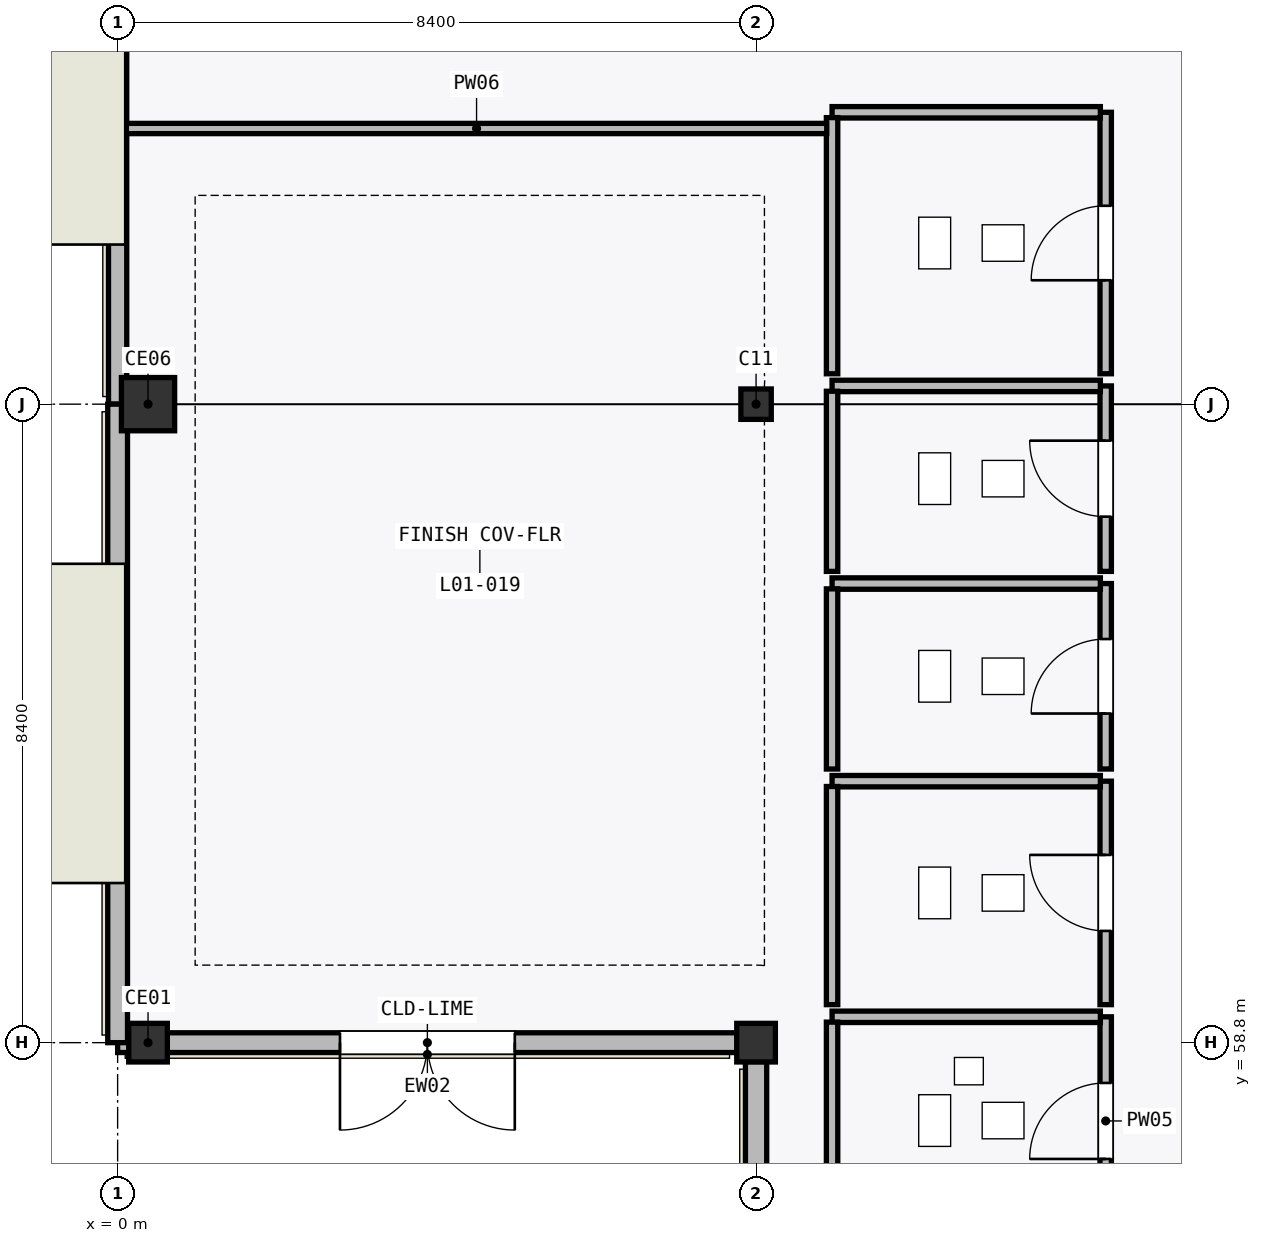
"""IFC4 building model, lengths in metres.
Left out: names, types, materials, properties, quantities, classifications, styles, units other than length and angle.
Written with IfcOpenShell. Run it as: python <this file> out.ifc"""

import sys

from ifc_helpers import new_model, si_unit, direction, frame, frame_2d, origin, origin_2d, place, context, subcontext, project, spatial, rectangle, hollow_circle, i_section, extrude, element, fill, save


model = new_model("IFC4")
c1 = context("Model", 3, precision=1e-05, world=origin(), true_north=direction((0.0, 1.0)))
c2 = subcontext(c1, "Body", "Model", "MODEL_VIEW")
j1 = project(units=[si_unit("LENGTHUNIT", "METRE"), si_unit("PLANEANGLEUNIT", "RADIAN")], contexts=[c1])
p1 = place(None, origin())
s1 = spatial("IfcSite", under=j1, at=p1, CompositionType="ELEMENT")
p2 = place(p1, origin())
s2 = spatial("IfcBuilding", under=s1, at=p2, CompositionType="ELEMENT")
p3 = place(p2, origin())
s3 = spatial("IfcBuildingStorey", under=s2, at=p3, CompositionType="ELEMENT", Elevation=0.0)
p4 = place(p3, frame((0.4, 58.8, 0.0), z_axis=(0.0, 0.0, 1.0), x_axis=(1.0, 0.0, 0.0)))
e1 = element("IfcColumn", 1, at=p4, inside=s3, PredefinedType="COLUMN", context=c2, shape_type="SweptSolid", body=[
    extrude(hollow_circle(Radius=0.254, WallThickness=0.016, at=origin_2d()), origin(), (0.0, 0.0, 1.0), 6.0),
])
p5 = place(p3, frame((0.4, 67.2, 0.0), z_axis=(0.0, 0.0, 1.0), x_axis=(1.0, 0.0, 0.0)))
e2 = element("IfcColumn", 2, at=p5, inside=s3, PredefinedType="COLUMN", context=c2, shape_type="SweptSolid", body=[
    extrude(rectangle(XDim=0.7, YDim=0.7, at=origin_2d()), origin(), (0.0, 0.0, 1.0), 6.0),
])
p6 = place(p3, frame((8.4, 58.8, 0.0), z_axis=(0.0, 0.0, 1.0), x_axis=(1.0, 0.0, 0.0)))
e3 = element("IfcColumn", 3, at=p6, inside=s3, PredefinedType="COLUMN", context=c2, shape_type="SweptSolid", body=[
    extrude(hollow_circle(Radius=0.254, WallThickness=0.016, at=origin_2d()), origin(), (0.0, 0.0, 1.0), 6.0),
])
p7 = place(p3, frame((8.4, 67.2, 0.0), z_axis=(0.0, 0.0, 1.0), x_axis=(1.0, 0.0, 0.0)))
e4 = element("IfcColumn", 4, at=p7, inside=s3, PredefinedType="COLUMN", context=c2, shape_type="SweptSolid", body=[
    extrude(i_section(OverallWidth=0.4, OverallDepth=0.4, WebThickness=0.013, FlangeThickness=0.021, FilletRadius=0.022, at=origin_2d()), origin(), (0.0, 0.0, 1.0), 6.0),
])
p8 = place(p3, frame((0.0, 58.8, 0.0), z_axis=(0.0, 0.0, 1.0), x_axis=(1.0, 0.0, 0.0)))
e5 = element("IfcWall", 5, at=p8, inside=s3, PredefinedType="STANDARD", context=c2, shape_type="SweptSolid", body=[
    extrude(rectangle(XDim=8.151, YDim=0.26, at=frame_2d((4.075, 0.0))), origin(), (0.0, 0.0, 1.0), 5.231),
])
p9 = place(p8, frame((2.926, 0.0, 0.0)))
e6 = element("IfcOpeningElement", 6, at=p9, cuts=e5, PredefinedType="OPENING", context=c2, shape_type="SweptSolid", body=[
    extrude(rectangle(XDim=2.3, YDim=2.4, at=frame_2d((1.15, 1.2))), frame((0.0, 0.14, 0.0), z_axis=(0.0, -1.0, 0.0), x_axis=(1.0, 0.0, 0.0)), (0.0, 0.0, 1.0), 0.28),
])
p10 = place(p3, frame((8.4, 58.551, 0.0), z_axis=(0.0, 0.0, 1.0), x_axis=(0.0, -1.0, 0.0)))
e7 = element("IfcWall", 7, at=p10, inside=s3, PredefinedType="STANDARD", context=c2, shape_type="SweptSolid", body=[
    extrude(rectangle(XDim=7.831, YDim=0.28, at=frame_2d((3.916, 0.0))), origin(), (0.0, 0.0, 1.0), 5.231),
])
p11 = place(p10, frame((2.765, 0.0, 0.0)))
e8 = element("IfcOpeningElement", 8, at=p11, cuts=e7, PredefinedType="OPENING", context=c2, shape_type="SweptSolid", body=[
    extrude(rectangle(XDim=2.3, YDim=2.4, at=frame_2d((1.15, 1.2))), frame((0.0, 0.15, 0.0), z_axis=(0.0, -1.0, 0.0), x_axis=(1.0, 0.0, 0.0)), (0.0, 0.0, 1.0), 0.3),
])
p12 = place(p3, frame((0.0, 75.6, 0.0), z_axis=(0.0, 0.0, 1.0), x_axis=(0.0, -1.0, 0.0)))
e9 = element("IfcWall", 9, at=p12, inside=s3, PredefinedType="STANDARD", context=c2, shape_type="SweptSolid", body=[
    extrude(rectangle(XDim=8.4, YDim=0.24, at=frame_2d((4.2, 0.0))), origin(), (0.0, 0.0, 1.0), 5.745),
])
p13 = place(p12, frame((2.013, 0.0, 0.95)))
e10 = element("IfcOpeningElement", 10, at=p13, cuts=e9, PredefinedType="OPENING", context=c2, shape_type="SweptSolid", body=[
    extrude(rectangle(XDim=1.35, YDim=2.1, at=frame_2d((0.675, 1.05))), frame((0.0, 0.13, 0.0), z_axis=(0.0, -1.0, 0.0), x_axis=(1.0, 0.0, 0.0)), (0.0, 0.0, 1.0), 0.26),
])
p14 = place(p3, frame((0.0, 67.2, 0.0), z_axis=(0.0, 0.0, 1.0), x_axis=(0.0, -1.0, 0.0)))
e11 = element("IfcWall", 11, at=p14, inside=s3, PredefinedType="STANDARD", context=c2, shape_type="SweptSolid", body=[
    extrude(rectangle(XDim=8.4, YDim=0.26, at=frame_2d((4.2, 0.0))), origin(), (0.0, 0.0, 1.0), 5.297),
])
p15 = place(p14, frame((3.45, 0.0, 0.95)))
e12 = element("IfcOpeningElement", 12, at=p15, cuts=e11, PredefinedType="OPENING", context=c2, shape_type="SweptSolid", body=[
    extrude(rectangle(XDim=1.5, YDim=2.1, at=frame_2d((0.75, 1.05))), frame((0.0, 0.14, 0.0), z_axis=(0.0, -1.0, 0.0), x_axis=(1.0, 0.0, 0.0)), (0.0, 0.0, 1.0), 0.28),
])
p16 = place(p3, frame((13.0, 56.4, 0.0), z_axis=(0.0, 0.0, 1.0), x_axis=(0.0, 1.0, 0.0)))
e13 = element("IfcWall", 13, at=p16, inside=s3, PredefinedType="PARTITIONING", context=c2, shape_type="SweptSolid", body=[
    extrude(rectangle(XDim=2.74, YDim=0.15, at=frame_2d((1.37, 0.0))), origin(), (0.0, 0.0, 1.0), 5.745),
])
p17 = place(p16, frame((0.87, 0.0, 0.0)))
e14 = element("IfcOpeningElement", 14, at=p17, cuts=e13, PredefinedType="OPENING", context=c2, shape_type="SweptSolid", body=[
    extrude(rectangle(XDim=1.0, YDim=2.1, at=frame_2d((0.5, 1.05))), frame((0.0, 0.085, 0.0), z_axis=(0.0, -1.0, 0.0), x_axis=(1.0, 0.0, 0.0)), (0.0, 0.0, 1.0), 0.17),
])
p18 = place(p3, frame((12.93, 59.14, 0.0), z_axis=(0.0, 0.0, 1.0), x_axis=(-1.0, 0.0, 0.0)))
e15 = element("IfcWall", 15, at=p18, inside=s3, PredefinedType="PARTITIONING", context=c2, shape_type="SweptSolid", body=[
    extrude(rectangle(XDim=3.53, YDim=0.15, at=frame_2d((1.765, 0.0))), origin(), (0.0, 0.0, 1.0), 4.825),
])
p19 = place(p3, frame((9.4, 59.07, 0.0), z_axis=(0.0, 0.0, 1.0), x_axis=(0.0, -1.0, 0.0)))
e16 = element("IfcWall", 16, at=p19, inside=s3, PredefinedType="PARTITIONING", context=c2, shape_type="SweptSolid", body=[
    extrude(rectangle(XDim=2.573, YDim=0.15, at=frame_2d((1.286, 0.0))), origin(), (0.0, 0.0, 1.0), 5.745),
])
p20 = place(p3, frame((13.0, 59.3, 0.0), z_axis=(0.0, 0.0, 1.0), x_axis=(0.0, 1.0, 0.0)))
e17 = element("IfcWall", 17, at=p20, inside=s3, PredefinedType="PARTITIONING", context=c2, shape_type="SweptSolid", body=[
    extrude(rectangle(XDim=2.94, YDim=0.15, at=frame_2d((1.47, 0.0))), origin(), (0.0, 0.0, 1.0), 5.745),
])
p21 = place(p20, frame((0.97, 0.0, 0.0)))
e18 = element("IfcOpeningElement", 18, at=p21, cuts=e17, PredefinedType="OPENING", context=c2, shape_type="SweptSolid", body=[
    extrude(rectangle(XDim=1.0, YDim=2.1, at=frame_2d((0.5, 1.05))), frame((0.0, 0.085, 0.0), z_axis=(0.0, -1.0, 0.0), x_axis=(1.0, 0.0, 0.0)), (0.0, 0.0, 1.0), 0.17),
])
p22 = place(p3, frame((12.93, 62.24, 0.0), z_axis=(0.0, 0.0, 1.0), x_axis=(-1.0, 0.0, 0.0)))
e19 = element("IfcWall", 19, at=p22, inside=s3, PredefinedType="PARTITIONING", context=c2, shape_type="SweptSolid", body=[
    extrude(rectangle(XDim=3.53, YDim=0.15, at=frame_2d((1.765, 0.0))), origin(), (0.0, 0.0, 1.0), 5.745),
])
p23 = place(p3, frame((9.4, 62.17, 0.0), z_axis=(0.0, 0.0, 1.0), x_axis=(0.0, -1.0, 0.0)))
e20 = element("IfcWall", 20, at=p23, inside=s3, PredefinedType="PARTITIONING", context=c2, shape_type="SweptSolid", body=[
    extrude(rectangle(XDim=2.87, YDim=0.15, at=frame_2d((1.435, 0.0))), origin(), (0.0, 0.0, 1.0), 5.745),
])
p24 = place(p3, frame((13.0, 62.4, 0.0), z_axis=(0.0, 0.0, 1.0), x_axis=(0.0, 1.0, 0.0)))
e21 = element("IfcWall", 21, at=p24, inside=s3, PredefinedType="PARTITIONING", context=c2, shape_type="SweptSolid", body=[
    extrude(rectangle(XDim=2.44, YDim=0.15, at=frame_2d((1.22, 0.0))), origin(), (0.0, 0.0, 1.0), 5.745),
])
p25 = place(p24, frame((0.73, 0.0, 0.0)))
e22 = element("IfcOpeningElement", 22, at=p25, cuts=e21, PredefinedType="OPENING", context=c2, shape_type="SweptSolid", body=[
    extrude(rectangle(XDim=0.98, YDim=2.1, at=frame_2d((0.49, 1.05))), frame((0.0, 0.085, 0.0), z_axis=(0.0, -1.0, 0.0), x_axis=(1.0, 0.0, 0.0)), (0.0, 0.0, 1.0), 0.17),
])
p26 = place(p3, frame((12.93, 64.84, 0.0), z_axis=(0.0, 0.0, 1.0), x_axis=(-1.0, 0.0, 0.0)))
e23 = element("IfcWall", 23, at=p26, inside=s3, PredefinedType="PARTITIONING", context=c2, shape_type="SweptSolid", body=[
    extrude(rectangle(XDim=3.53, YDim=0.15, at=frame_2d((1.765, 0.0))), origin(), (0.0, 0.0, 1.0), 5.745),
])
p27 = place(p3, frame((9.4, 64.77, 0.0), z_axis=(0.0, 0.0, 1.0), x_axis=(0.0, -1.0, 0.0)))
e24 = element("IfcWall", 24, at=p27, inside=s3, PredefinedType="PARTITIONING", context=c2, shape_type="SweptSolid", body=[
    extrude(rectangle(XDim=2.37, YDim=0.15, at=frame_2d((1.185, 0.0))), origin(), (0.0, 0.0, 1.0), 5.745),
])
p28 = place(p3, frame((13.0, 65.0, 0.0), z_axis=(0.0, 0.0, 1.0), x_axis=(0.0, 1.0, 0.0)))
e25 = element("IfcWall", 25, at=p28, inside=s3, PredefinedType="PARTITIONING", context=c2, shape_type="SweptSolid", body=[
    extrude(rectangle(XDim=2.44, YDim=0.15, at=frame_2d((1.22, 0.0))), origin(), (0.0, 0.0, 1.0), 5.745),
])
p29 = place(p28, frame((0.72, 0.0, 0.0)))
e26 = element("IfcOpeningElement", 26, at=p29, cuts=e25, PredefinedType="OPENING", context=c2, shape_type="SweptSolid", body=[
    extrude(rectangle(XDim=1.0, YDim=2.1, at=frame_2d((0.5, 1.05))), frame((0.0, 0.085, 0.0), z_axis=(0.0, -1.0, 0.0), x_axis=(1.0, 0.0, 0.0)), (0.0, 0.0, 1.0), 0.17),
])
p30 = place(p3, frame((12.93, 67.44, 0.0), z_axis=(0.0, 0.0, 1.0), x_axis=(-1.0, 0.0, 0.0)))
e27 = element("IfcWall", 27, at=p30, inside=s3, PredefinedType="PARTITIONING", context=c2, shape_type="SweptSolid", body=[
    extrude(rectangle(XDim=3.53, YDim=0.15, at=frame_2d((1.765, 0.0))), origin(), (0.0, 0.0, 1.0), 5.143),
])
p31 = place(p3, frame((9.4, 67.37, 0.0), z_axis=(0.0, 0.0, 1.0), x_axis=(0.0, -1.0, 0.0)))
e28 = element("IfcWall", 28, at=p31, inside=s3, PredefinedType="PARTITIONING", context=c2, shape_type="SweptSolid", body=[
    extrude(rectangle(XDim=2.37, YDim=0.15, at=frame_2d((1.185, 0.0))), origin(), (0.0, 0.0, 1.0), 5.745),
])
p32 = place(p3, frame((13.0, 67.6, 0.0), z_axis=(0.0, 0.0, 1.0), x_axis=(0.0, 1.0, 0.0)))
e29 = element("IfcWall", 29, at=p32, inside=s3, PredefinedType="PARTITIONING", context=c2, shape_type="SweptSolid", body=[
    extrude(rectangle(XDim=3.44, YDim=0.15, at=frame_2d((1.72, 0.0))), origin(), (0.0, 0.0, 1.0), 5.745),
])
p33 = place(p32, frame((1.23, 0.0, 0.0)))
e30 = element("IfcOpeningElement", 30, at=p33, cuts=e29, PredefinedType="OPENING", context=c2, shape_type="SweptSolid", body=[
    extrude(rectangle(XDim=0.98, YDim=2.1, at=frame_2d((0.49, 1.05))), frame((0.0, 0.085, 0.0), z_axis=(0.0, -1.0, 0.0), x_axis=(1.0, 0.0, 0.0)), (0.0, 0.0, 1.0), 0.17),
])
p34 = place(p3, frame((12.93, 71.04, 0.0), z_axis=(0.0, 0.0, 1.0), x_axis=(-1.0, 0.0, 0.0)))
e31 = element("IfcWall", 31, at=p34, inside=s3, PredefinedType="PARTITIONING", context=c2, shape_type="SweptSolid", body=[
    extrude(rectangle(XDim=3.53, YDim=0.15, at=frame_2d((1.765, 0.0))), origin(), (0.0, 0.0, 1.0), 5.745),
])
p35 = place(p3, frame((9.4, 70.97, 0.0), z_axis=(0.0, 0.0, 1.0), x_axis=(0.0, -1.0, 0.0)))
e32 = element("IfcWall", 32, at=p35, inside=s3, PredefinedType="PARTITIONING", context=c2, shape_type="SweptSolid", body=[
    extrude(rectangle(XDim=3.37, YDim=0.15, at=frame_2d((1.685, 0.0))), origin(), (0.0, 0.0, 1.0), 5.745),
])
p36 = place(p3, frame((9.33, 70.827, 0.0), z_axis=(0.0, 0.0, 1.0), x_axis=(-1.0, 0.0, 0.0)))
e33 = element("IfcWall", 33, at=p36, inside=s3, PredefinedType="PARTITIONING", context=c2, shape_type="SweptSolid", body=[
    extrude(rectangle(XDim=9.215, YDim=0.135, at=frame_2d((4.607, 0.0))), origin(), (0.0, 0.0, 1.0), 5.745),
])
p37 = place(p9, frame((2.3, 0.0, 0.0), z_axis=(0.0, 0.0, 1.0), x_axis=(-1.0, 0.0, 0.0)))
e34 = element("IfcDoor", 34, at=p37, inside=s3, OperationType="DOUBLE_DOOR_SINGLE_SWING", PredefinedType="DOOR", context=c2, shape_type="SweptSolid", body=[
    extrude(rectangle(XDim=2.3, YDim=2.4, at=frame_2d((1.15, 1.2))), frame((0.0, 0.025, 0.0), z_axis=(0.0, -1.0, 0.0), x_axis=(1.0, 0.0, 0.0)), (0.0, 0.0, 1.0), 0.05),
])
fill(e6, e34)
p38 = place(p15, origin())
e35 = element("IfcWindow", 35, at=p38, inside=s3, PartitioningType="SINGLE_PANEL", PredefinedType="WINDOW", context=c2, shape_type="SweptSolid", body=[
    extrude(rectangle(XDim=1.5, YDim=2.1, at=frame_2d((0.75, 1.05))), frame((0.0, 0.03, 0.0), z_axis=(0.0, -1.0, 0.0), x_axis=(1.0, 0.0, 0.0)), (0.0, 0.0, 1.0), 0.06),
])
fill(e12, e35)
p39 = place(p17, origin())
e36 = element("IfcDoor", 36, at=p39, inside=s3, OperationType="SINGLE_SWING_LEFT", PredefinedType="DOOR", context=c2, shape_type="SweptSolid", body=[
    extrude(rectangle(XDim=1.0, YDim=2.1, at=frame_2d((0.5, 1.05))), frame((0.0, 0.025, 0.0), z_axis=(0.0, -1.0, 0.0), x_axis=(1.0, 0.0, 0.0)), (0.0, 0.0, 1.0), 0.05),
])
fill(e14, e36)
p40 = place(p21, origin())
e37 = element("IfcDoor", 37, at=p40, inside=s3, OperationType="SINGLE_SWING_RIGHT", PredefinedType="DOOR", context=c2, shape_type="SweptSolid", body=[
    extrude(rectangle(XDim=1.0, YDim=2.1, at=frame_2d((0.5, 1.05))), frame((0.0, 0.025, 0.0), z_axis=(0.0, -1.0, 0.0), x_axis=(1.0, 0.0, 0.0)), (0.0, 0.0, 1.0), 0.05),
])
fill(e18, e37)
p41 = place(p25, origin())
e38 = element("IfcDoor", 38, at=p41, inside=s3, OperationType="SINGLE_SWING_LEFT", PredefinedType="DOOR", context=c2, shape_type="SweptSolid", body=[
    extrude(rectangle(XDim=0.98, YDim=2.1, at=frame_2d((0.49, 1.05))), frame((0.0, 0.025, 0.0), z_axis=(0.0, -1.0, 0.0), x_axis=(1.0, 0.0, 0.0)), (0.0, 0.0, 1.0), 0.05),
])
fill(e22, e38)
p42 = place(p29, origin())
e39 = element("IfcDoor", 39, at=p42, inside=s3, OperationType="SINGLE_SWING_RIGHT", PredefinedType="DOOR", context=c2, shape_type="SweptSolid", body=[
    extrude(rectangle(XDim=1.0, YDim=2.1, at=frame_2d((0.5, 1.05))), frame((0.0, 0.025, 0.0), z_axis=(0.0, -1.0, 0.0), x_axis=(1.0, 0.0, 0.0)), (0.0, 0.0, 1.0), 0.05),
])
fill(e26, e39)
p43 = place(p33, origin())
e40 = element("IfcDoor", 40, at=p43, inside=s3, OperationType="SINGLE_SWING_LEFT", PredefinedType="DOOR", context=c2, shape_type="SweptSolid", body=[
    extrude(rectangle(XDim=0.98, YDim=2.1, at=frame_2d((0.49, 1.05))), frame((0.0, 0.025, 0.0), z_axis=(0.0, -1.0, 0.0), x_axis=(1.0, 0.0, 0.0)), (0.0, 0.0, 1.0), 0.05),
])
fill(e30, e40)
save(model, sys.argv[1])
